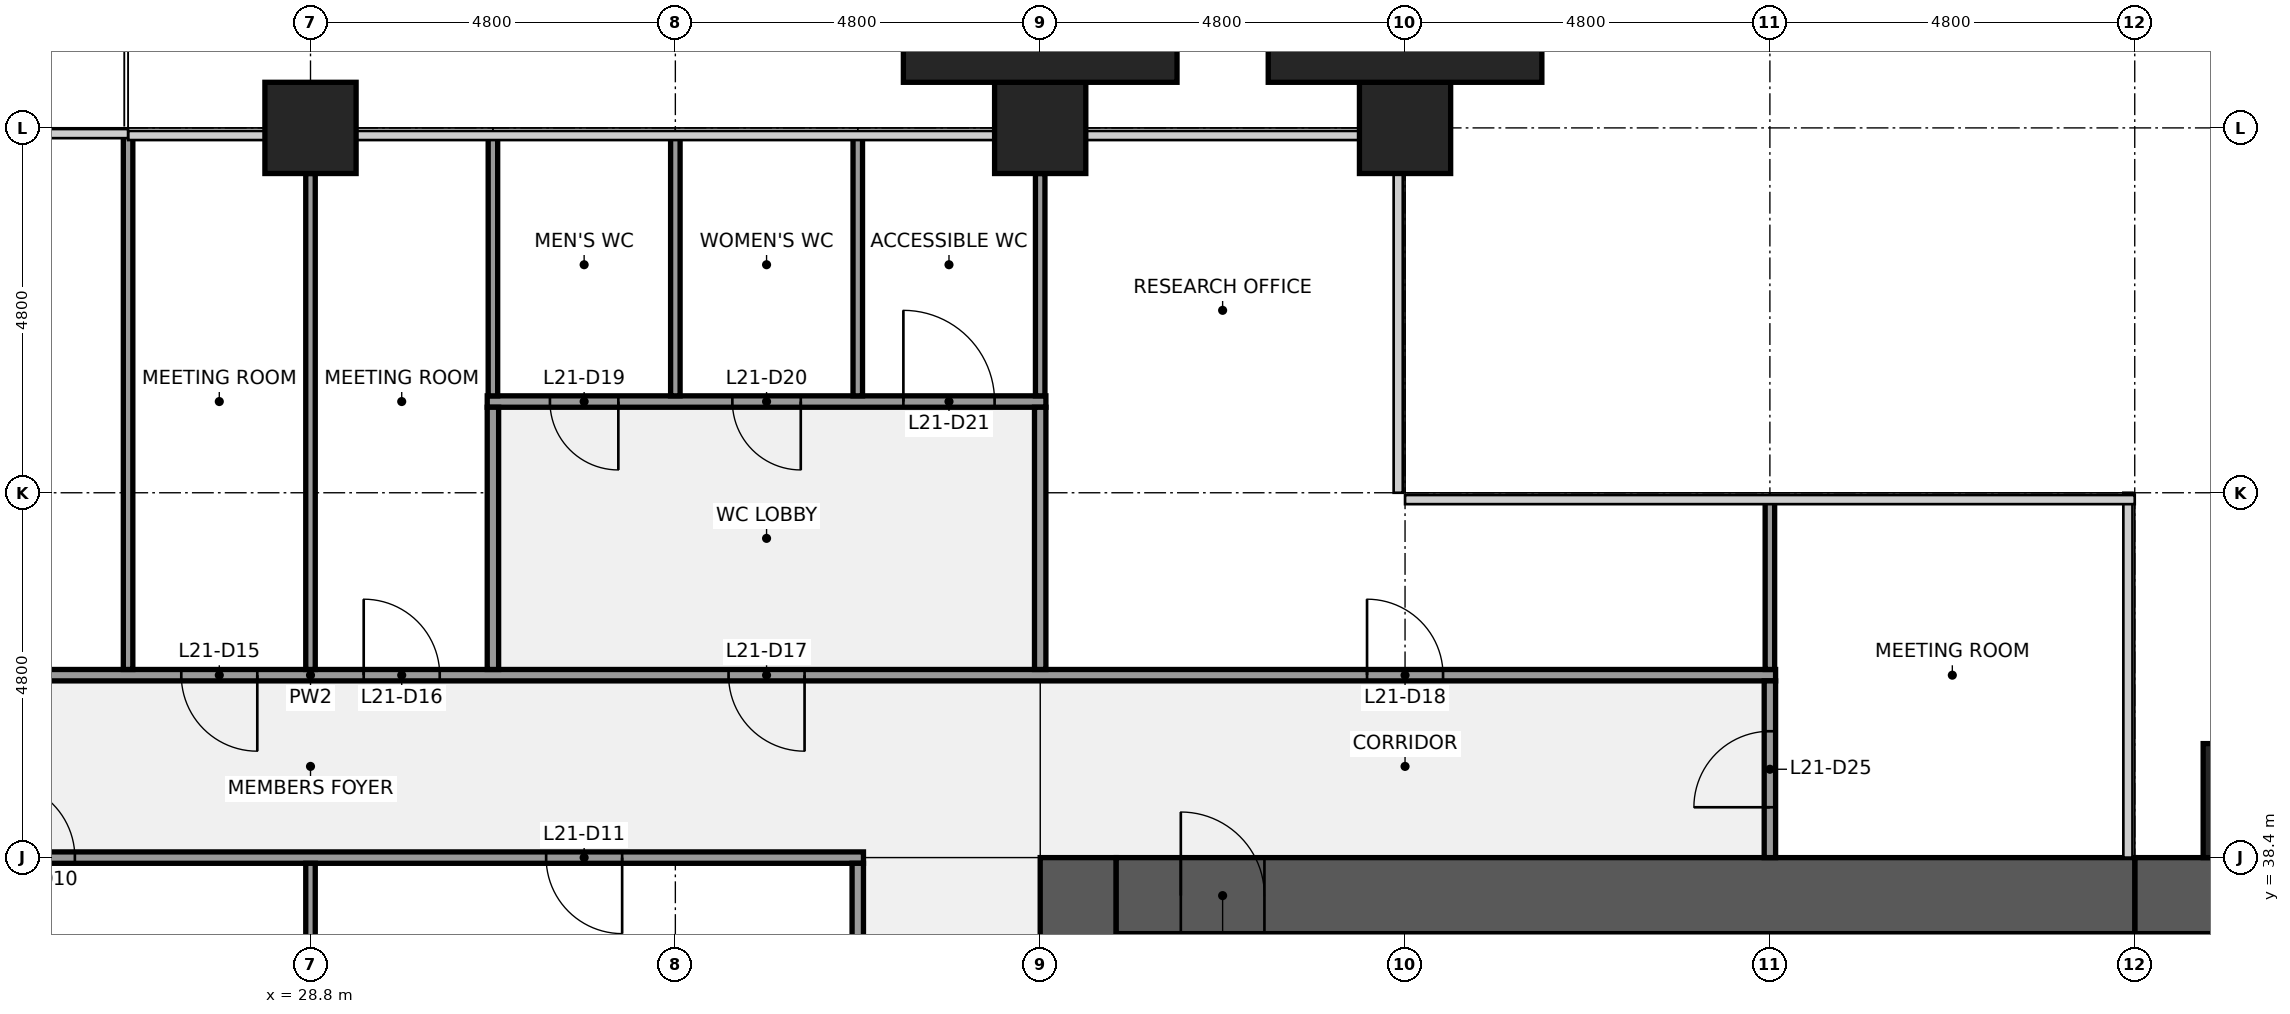
"""IFC4 building model, lengths in metres.
Left out: names, types, materials, properties, quantities, classifications, styles, units other than length and angle.
Written with IfcOpenShell. Run it as: python <this file> out.ifc"""

import sys

from ifc_helpers import new_model, si_unit, direction, frame, frame_2d, origin, origin_2d, place, context, subcontext, project, spatial, rectangle, extrude, element, fill, save


model = new_model("IFC4")
c1 = context("Model", 3, precision=1e-05, world=origin(), true_north=direction((0.0, 1.0)))
c2 = subcontext(c1, "Body", "Model", "MODEL_VIEW")
j1 = project(units=[si_unit("LENGTHUNIT", "METRE"), si_unit("PLANEANGLEUNIT", "RADIAN")], contexts=[c1])
p1 = place(None, origin())
s1 = spatial("IfcSite", under=j1, at=p1, CompositionType="ELEMENT")
p2 = place(p1, origin())
s2 = spatial("IfcBuilding", under=s1, at=p2, CompositionType="ELEMENT")
p3 = place(p2, frame((0.0, 0.0, 104.1)))
s3 = spatial("IfcBuildingStorey", under=s2, at=p3, CompositionType="ELEMENT", Elevation=104.1)
for number, where, z_axis, x_axis in (
    (1, (28.8, 48.0, 0.0), (0.0, 0.0, 1.0), (1.0, 0.0, 0.0)),
    (2, (38.4, 48.0, 0.0), (0.0, 0.0, 1.0), (1.0, 0.0, 0.0)),
    (3, (43.2, 48.0, 0.0), (0.0, 0.0, 1.0), (1.0, 0.0, 0.0)),
):
    element("IfcColumn", number, at=place(p3, frame(where, z_axis=z_axis, x_axis=x_axis)), inside=s3, PredefinedType="COLUMN", context=c2, shape_type="SweptSolid", body=[
        extrude(rectangle(XDim=1.2, YDim=1.2, at=origin_2d()), origin(), (0.0, 0.0, 1.0), 4.0),
    ])
p4 = place(p3, frame((38.9, 9.6, 0.0), z_axis=(0.0, 0.0, 1.0), x_axis=(0.0, 1.0, 0.0)))
e4 = element("IfcWall", 4, at=p4, inside=s3, PredefinedType="SHEAR", context=c2, shape_type="SweptSolid", body=[
    extrude(rectangle(XDim=28.8, YDim=1.0, at=frame_2d((14.4, 0.0))), origin(), (0.0, 0.0, 1.0), 3.84),
])
p5 = place(p4, frame((8.7, 0.0, 0.0)))
e5 = element("IfcOpeningElement", 5, at=p5, cuts=e4, PredefinedType="OPENING", context=c2, shape_type="SweptSolid", body=[
    extrude(rectangle(XDim=1.8, YDim=2.1, at=frame_2d((0.9, 1.05))), frame((0.0, 0.51, 0.0), z_axis=(0.0, -1.0, 0.0), x_axis=(1.0, 0.0, 0.0)), (0.0, 0.0, 1.0), 1.02),
])
p6 = place(p4, frame((18.3, 0.0, 0.0)))
e6 = element("IfcOpeningElement", 6, at=p6, cuts=e4, PredefinedType="OPENING", context=c2, shape_type="SweptSolid", body=[
    extrude(rectangle(XDim=1.8, YDim=2.1, at=frame_2d((0.9, 1.05))), frame((0.0, 0.51, 0.0), z_axis=(0.0, -1.0, 0.0), x_axis=(1.0, 0.0, 0.0)), (0.0, 0.0, 1.0), 1.02),
])
p7 = place(p3, frame((43.85, 37.3, 0.0), z_axis=(0.0, 0.0, 1.0), x_axis=(1.0, 0.0, 0.0)))
e7 = element("IfcWall", 7, at=p7, inside=s3, PredefinedType="SHEAR", context=c2, shape_type="SweptSolid", body=[
    extrude(rectangle(XDim=7.5, YDim=0.2, at=frame_2d((3.75, 0.0))), origin(), (0.0, 0.0, 1.0), 3.84),
])
p8 = place(p3, frame((52.8, 37.9, 0.0), z_axis=(0.0, 0.0, 1.0), x_axis=(1.0, 0.0, 0.0)))
e8 = element("IfcWall", 8, at=p8, inside=s3, PredefinedType="SHEAR", context=c2, shape_type="SweptSolid", body=[
    extrude(rectangle(XDim=3.8, YDim=1.0, at=frame_2d((1.9, 0.0))), origin(), (0.0, 0.0, 1.0), 3.84),
])
p9 = place(p3, frame((39.4, 37.9, 0.0), z_axis=(0.0, 0.0, 1.0), x_axis=(1.0, 0.0, 0.0)))
e9 = element("IfcWall", 9, at=p9, inside=s3, PredefinedType="SHEAR", context=c2, shape_type="SweptSolid", body=[
    extrude(rectangle(XDim=13.4, YDim=1.0, at=frame_2d((6.7, 0.0))), origin(), (0.0, 0.0, 1.0), 3.84),
])
p10 = place(p9, frame((0.85, 0.0, 0.0)))
e10 = element("IfcOpeningElement", 10, at=p10, cuts=e9, PredefinedType="OPENING", context=c2, shape_type="SweptSolid", body=[
    extrude(rectangle(XDim=1.1, YDim=2.1, at=frame_2d((0.55, 1.05))), frame((0.0, 0.51, 0.0), z_axis=(0.0, -1.0, 0.0), x_axis=(1.0, 0.0, 0.0)), (0.0, 0.0, 1.0), 1.02),
])
p11 = place(p3, frame((21.525, 38.4, 0.0), z_axis=(0.0, 0.0, 1.0), x_axis=(1.0, 0.0, 0.0)))
e11 = element("IfcWall", 11, at=p11, inside=s3, PredefinedType="PARTITIONING", context=c2, shape_type="SweptSolid", body=[
    extrude(rectangle(XDim=14.55, YDim=0.15, at=frame_2d((7.275, 0.0))), origin(), (0.0, 0.0, 1.0), 2.936),
])
p12 = place(p11, frame((3.175, 0.0, 0.0)))
e12 = element("IfcOpeningElement", 12, at=p12, cuts=e11, PredefinedType="OPENING", context=c2, shape_type="SweptSolid", body=[
    extrude(rectangle(XDim=1.0, YDim=2.1, at=frame_2d((0.5, 1.05))), frame((0.0, 0.085, 0.0), z_axis=(0.0, -1.0, 0.0), x_axis=(1.0, 0.0, 0.0)), (0.0, 0.0, 1.0), 0.17),
])
p13 = place(p11, frame((10.375, 0.0, 0.0)))
e13 = element("IfcOpeningElement", 13, at=p13, cuts=e11, PredefinedType="OPENING", context=c2, shape_type="SweptSolid", body=[
    extrude(rectangle(XDim=1.0, YDim=2.1, at=frame_2d((0.5, 1.05))), frame((0.0, 0.085, 0.0), z_axis=(0.0, -1.0, 0.0), x_axis=(1.0, 0.0, 0.0)), (0.0, 0.0, 1.0), 0.17),
])
p14 = place(p3, frame((9.525, 40.8, 0.0), z_axis=(0.0, 0.0, 1.0), x_axis=(1.0, 0.0, 0.0)))
e14 = element("IfcWall", 14, at=p14, inside=s3, PredefinedType="PARTITIONING", context=c2, shape_type="SweptSolid", body=[
    extrude(rectangle(XDim=38.55, YDim=0.15, at=frame_2d((19.275, 0.0))), origin(), (0.0, 0.0, 1.0), 2.936),
])
p15 = place(p14, frame((4.375, 0.0, 0.0)))
e15 = element("IfcOpeningElement", 15, at=p15, cuts=e14, PredefinedType="OPENING", context=c2, shape_type="SweptSolid", body=[
    extrude(rectangle(XDim=1.0, YDim=2.1, at=frame_2d((0.5, 1.05))), frame((0.0, 0.085, 0.0), z_axis=(0.0, -1.0, 0.0), x_axis=(1.0, 0.0, 0.0)), (0.0, 0.0, 1.0), 0.17),
])
p16 = place(p14, frame((10.375, 0.0, 0.0)))
e16 = element("IfcOpeningElement", 16, at=p16, cuts=e14, PredefinedType="OPENING", context=c2, shape_type="SweptSolid", body=[
    extrude(rectangle(XDim=1.0, YDim=2.1, at=frame_2d((0.5, 1.05))), frame((0.0, 0.085, 0.0), z_axis=(0.0, -1.0, 0.0), x_axis=(1.0, 0.0, 0.0)), (0.0, 0.0, 1.0), 0.17),
])
p17 = place(p14, frame((13.975, 0.0, 0.0)))
e17 = element("IfcOpeningElement", 17, at=p17, cuts=e14, PredefinedType="OPENING", context=c2, shape_type="SweptSolid", body=[
    extrude(rectangle(XDim=1.0, YDim=2.1, at=frame_2d((0.5, 1.05))), frame((0.0, 0.085, 0.0), z_axis=(0.0, -1.0, 0.0), x_axis=(1.0, 0.0, 0.0)), (0.0, 0.0, 1.0), 0.17),
])
p18 = place(p14, frame((17.575, 0.0, 0.0)))
e18 = element("IfcOpeningElement", 18, at=p18, cuts=e14, PredefinedType="OPENING", context=c2, shape_type="SweptSolid", body=[
    extrude(rectangle(XDim=1.0, YDim=2.1, at=frame_2d((0.5, 1.05))), frame((0.0, 0.085, 0.0), z_axis=(0.0, -1.0, 0.0), x_axis=(1.0, 0.0, 0.0)), (0.0, 0.0, 1.0), 0.17),
])
p19 = place(p14, frame((19.975, 0.0, 0.0)))
e19 = element("IfcOpeningElement", 19, at=p19, cuts=e14, PredefinedType="OPENING", context=c2, shape_type="SweptSolid", body=[
    extrude(rectangle(XDim=1.0, YDim=2.1, at=frame_2d((0.5, 1.05))), frame((0.0, 0.085, 0.0), z_axis=(0.0, -1.0, 0.0), x_axis=(1.0, 0.0, 0.0)), (0.0, 0.0, 1.0), 0.17),
])
p20 = place(p14, frame((24.775, 0.0, 0.0)))
e20 = element("IfcOpeningElement", 20, at=p20, cuts=e14, PredefinedType="OPENING", context=c2, shape_type="SweptSolid", body=[
    extrude(rectangle(XDim=1.0, YDim=2.1, at=frame_2d((0.5, 1.05))), frame((0.0, 0.085, 0.0), z_axis=(0.0, -1.0, 0.0), x_axis=(1.0, 0.0, 0.0)), (0.0, 0.0, 1.0), 0.17),
])
p21 = place(p14, frame((33.175, 0.0, 0.0)))
e21 = element("IfcOpeningElement", 21, at=p21, cuts=e14, PredefinedType="OPENING", context=c2, shape_type="SweptSolid", body=[
    extrude(rectangle(XDim=1.0, YDim=2.1, at=frame_2d((0.5, 1.05))), frame((0.0, 0.085, 0.0), z_axis=(0.0, -1.0, 0.0), x_axis=(1.0, 0.0, 0.0)), (0.0, 0.0, 1.0), 0.17),
])
p22 = place(p3, frame((31.125, 44.4, 0.0), z_axis=(0.0, 0.0, 1.0), x_axis=(1.0, 0.0, 0.0)))
e22 = element("IfcWall", 22, at=p22, inside=s3, PredefinedType="PARTITIONING", context=c2, shape_type="SweptSolid", body=[
    extrude(rectangle(XDim=7.35, YDim=0.15, at=frame_2d((3.675, 0.0))), origin(), (0.0, 0.0, 1.0), 2.936),
])
p23 = place(p22, frame((0.825, 0.0, 0.0)))
e23 = element("IfcOpeningElement", 23, at=p23, cuts=e22, PredefinedType="OPENING", context=c2, shape_type="SweptSolid", body=[
    extrude(rectangle(XDim=0.9, YDim=2.1, at=frame_2d((0.45, 1.05))), frame((0.0, 0.085, 0.0), z_axis=(0.0, -1.0, 0.0), x_axis=(1.0, 0.0, 0.0)), (0.0, 0.0, 1.0), 0.17),
])
p24 = place(p22, frame((3.225, 0.0, 0.0)))
e24 = element("IfcOpeningElement", 24, at=p24, cuts=e22, PredefinedType="OPENING", context=c2, shape_type="SweptSolid", body=[
    extrude(rectangle(XDim=0.9, YDim=2.1, at=frame_2d((0.45, 1.05))), frame((0.0, 0.085, 0.0), z_axis=(0.0, -1.0, 0.0), x_axis=(1.0, 0.0, 0.0)), (0.0, 0.0, 1.0), 0.17),
])
p25 = place(p22, frame((5.475, 0.0, 0.0)))
e25 = element("IfcOpeningElement", 25, at=p25, cuts=e22, PredefinedType="OPENING", context=c2, shape_type="SweptSolid", body=[
    extrude(rectangle(XDim=1.2, YDim=2.1, at=frame_2d((0.6, 1.05))), frame((0.0, 0.085, 0.0), z_axis=(0.0, -1.0, 0.0), x_axis=(1.0, 0.0, 0.0)), (0.0, 0.0, 1.0), 0.17),
])
p26 = place(p3, frame((26.4, 40.875, 0.0), z_axis=(0.0, 0.0, 1.0), x_axis=(0.0, 1.0, 0.0)))
e26 = element("IfcWall", 26, at=p26, inside=s3, PredefinedType="PARTITIONING", context=c2, shape_type="SweptSolid", body=[
    extrude(rectangle(XDim=7.025, YDim=0.125, at=frame_2d((3.512, 0.0))), origin(), (0.0, 0.0, 1.0), 2.936),
])
p27 = place(p3, frame((28.8, 33.663, 0.0), z_axis=(0.0, 0.0, 1.0), x_axis=(0.0, 1.0, 0.0)))
e27 = element("IfcWall", 27, at=p27, inside=s3, PredefinedType="PARTITIONING", context=c2, shape_type="SweptSolid", body=[
    extrude(rectangle(XDim=4.662, YDim=0.125, at=frame_2d((2.331, 0.0))), origin(), (0.0, 0.0, 1.0), 2.936),
])
p28 = place(p3, frame((28.8, 40.875, 0.0), z_axis=(0.0, 0.0, 1.0), x_axis=(0.0, 1.0, 0.0)))
e28 = element("IfcWall", 28, at=p28, inside=s3, PredefinedType="PARTITIONING", context=c2, shape_type="SweptSolid", body=[
    extrude(rectangle(XDim=6.525, YDim=0.125, at=frame_2d((3.262, 0.0))), origin(), (0.0, 0.0, 1.0), 2.936),
])
p29 = place(p3, frame((31.2, 44.475, 0.0), z_axis=(0.0, 0.0, 1.0), x_axis=(0.0, 1.0, 0.0)))
e29 = element("IfcWall", 29, at=p29, inside=s3, PredefinedType="PARTITIONING", context=c2, shape_type="SweptSolid", body=[
    extrude(rectangle(XDim=3.425, YDim=0.125, at=frame_2d((1.712, 0.0))), origin(), (0.0, 0.0, 1.0), 2.936),
])
p30 = place(p3, frame((31.2, 40.875, 0.0), z_axis=(0.0, 0.0, 1.0), x_axis=(0.0, 1.0, 0.0)))
e30 = element("IfcWall", 30, at=p30, inside=s3, PredefinedType="PARTITIONING", context=c2, shape_type="SweptSolid", body=[
    extrude(rectangle(XDim=3.45, YDim=0.15, at=frame_2d((1.725, 0.0))), origin(), (0.0, 0.0, 1.0), 2.936),
])
for number, where, z_axis, x_axis in (
    (31, (33.6, 44.475, 0.0), (0.0, 0.0, 1.0), (0.0, 1.0, 0.0)),
    (32, (36.0, 44.475, 0.0), (0.0, 0.0, 1.0), (0.0, 1.0, 0.0)),
):
    element("IfcWall", number, at=place(p3, frame(where, z_axis=z_axis, x_axis=x_axis)), inside=s3, PredefinedType="PARTITIONING", context=c2, shape_type="SweptSolid", body=[
        extrude(rectangle(XDim=3.425, YDim=0.125, at=frame_2d((1.712, 0.0))), origin(), (0.0, 0.0, 1.0), 2.936),
    ])
p31 = place(p3, frame((36.0, 33.675, 0.0), z_axis=(0.0, 0.0, 1.0), x_axis=(0.0, 1.0, 0.0)))
e33 = element("IfcWall", 33, at=p31, inside=s3, PredefinedType="PARTITIONING", context=c2, shape_type="SweptSolid", body=[
    extrude(rectangle(XDim=4.65, YDim=0.15, at=frame_2d((2.325, 0.0))), origin(), (0.0, 0.0, 1.0), 2.936),
])
p32 = place(p3, frame((38.4, 44.475, 0.0), z_axis=(0.0, 0.0, 1.0), x_axis=(0.0, 1.0, 0.0)))
e34 = element("IfcWall", 34, at=p32, inside=s3, PredefinedType="PARTITIONING", context=c2, shape_type="SweptSolid", body=[
    extrude(rectangle(XDim=2.925, YDim=0.125, at=frame_2d((1.462, 0.0))), origin(), (0.0, 0.0, 1.0), 2.936),
])
p33 = place(p3, frame((38.4, 40.875, 0.0), z_axis=(0.0, 0.0, 1.0), x_axis=(0.0, 1.0, 0.0)))
e35 = element("IfcWall", 35, at=p33, inside=s3, PredefinedType="PARTITIONING", context=c2, shape_type="SweptSolid", body=[
    extrude(rectangle(XDim=3.45, YDim=0.15, at=frame_2d((1.725, 0.0))), origin(), (0.0, 0.0, 1.0), 2.936),
])
p34 = place(p3, frame((48.0, 40.875, 0.0), z_axis=(0.0, 0.0, 1.0), x_axis=(0.0, 1.0, 0.0)))
e36 = element("IfcWall", 36, at=p34, inside=s3, PredefinedType="PARTITIONING", context=c2, shape_type="SweptSolid", body=[
    extrude(rectangle(XDim=2.225, YDim=0.125, at=frame_2d((1.113, 0.0))), origin(), (0.0, 0.0, 1.0), 2.936),
])
p35 = place(p3, frame((48.0, 38.4, 0.0), z_axis=(0.0, 0.0, 1.0), x_axis=(0.0, 1.0, 0.0)))
e37 = element("IfcWall", 37, at=p35, inside=s3, PredefinedType="PARTITIONING", context=c2, shape_type="SweptSolid", body=[
    extrude(rectangle(XDim=2.325, YDim=0.15, at=frame_2d((1.163, 0.0))), origin(), (0.0, 0.0, 1.0), 2.936),
])
p36 = place(p35, frame((0.663, 0.0, 0.0)))
e38 = element("IfcOpeningElement", 38, at=p36, cuts=e37, PredefinedType="OPENING", context=c2, shape_type="SweptSolid", body=[
    extrude(rectangle(XDim=1.0, YDim=2.1, at=frame_2d((0.5, 1.05))), frame((0.0, 0.085, 0.0), z_axis=(0.0, -1.0, 0.0), x_axis=(1.0, 0.0, 0.0)), (0.0, 0.0, 1.0), 0.17),
])
p37 = place(p3, frame((55.2, 39.15, 0.0), z_axis=(0.0, 0.0, 1.0), x_axis=(1.0, 0.0, 0.0)))
e39 = element("IfcColumn", 39, at=p37, inside=s3, PredefinedType="PILASTER", context=c2, shape_type="SweptSolid", body=[
    extrude(rectangle(XDim=3.0, YDim=1.5, at=origin_2d()), origin(), (0.0, 0.0, 1.0), 4.0),
])
for number, where, z_axis, x_axis in (
    (40, (38.4, 49.05, 0.0), (0.0, 0.0, 1.0), (1.0, 0.0, 0.0)),
    (41, (43.2, 49.05, 0.0), (0.0, 0.0, 1.0), (1.0, 0.0, 0.0)),
):
    element("IfcColumn", number, at=place(p3, frame(where, z_axis=z_axis, x_axis=x_axis)), inside=s3, PredefinedType="PILASTER", context=c2, shape_type="SweptSolid", body=[
        extrude(rectangle(XDim=3.6, YDim=0.9, at=origin_2d()), origin(), (0.0, 0.0, 1.0), 4.0),
    ])
p38 = place(p10, origin())
e42 = element("IfcDoor", 42, at=p38, inside=s3, OperationType="SINGLE_SWING_LEFT", PredefinedType="DOOR", context=c2, shape_type="SweptSolid", body=[
    extrude(rectangle(XDim=1.1, YDim=2.1, at=frame_2d((0.55, 1.05))), frame((0.0, 0.025, 0.0), z_axis=(0.0, -1.0, 0.0), x_axis=(1.0, 0.0, 0.0)), (0.0, 0.0, 1.0), 0.05),
])
fill(e10, e42)
p39 = place(p12, origin())
e43 = element("IfcDoor", 43, at=p39, inside=s3, OperationType="SINGLE_SWING_LEFT", PredefinedType="DOOR", context=c2, shape_type="SweptSolid", body=[
    extrude(rectangle(XDim=1.0, YDim=2.1, at=frame_2d((0.5, 1.05))), frame((0.0, 0.025, 0.0), z_axis=(0.0, -1.0, 0.0), x_axis=(1.0, 0.0, 0.0)), (0.0, 0.0, 1.0), 0.05),
])
fill(e12, e43)
p40 = place(p13, origin())
e44 = element("IfcDoor", 44, at=p40, inside=s3, OperationType="SINGLE_SWING_RIGHT", PredefinedType="DOOR", context=c2, shape_type="SweptSolid", body=[
    extrude(rectangle(XDim=1.0, YDim=2.1, at=frame_2d((0.5, 1.05))), frame((0.0, 0.025, 0.0), z_axis=(0.0, -1.0, 0.0), x_axis=(1.0, 0.0, 0.0)), (0.0, 0.0, 1.0), 0.05),
])
fill(e13, e44)
p41 = place(p18, origin())
e45 = element("IfcDoor", 45, at=p41, inside=s3, OperationType="SINGLE_SWING_RIGHT", PredefinedType="DOOR", context=c2, shape_type="SweptSolid", body=[
    extrude(rectangle(XDim=1.0, YDim=2.1, at=frame_2d((0.5, 1.05))), frame((0.0, 0.025, 0.0), z_axis=(0.0, -1.0, 0.0), x_axis=(1.0, 0.0, 0.0)), (0.0, 0.0, 1.0), 0.05),
])
fill(e18, e45)
p42 = place(p19, origin())
e46 = element("IfcDoor", 46, at=p42, inside=s3, OperationType="SINGLE_SWING_LEFT", PredefinedType="DOOR", context=c2, shape_type="SweptSolid", body=[
    extrude(rectangle(XDim=1.0, YDim=2.1, at=frame_2d((0.5, 1.05))), frame((0.0, 0.025, 0.0), z_axis=(0.0, -1.0, 0.0), x_axis=(1.0, 0.0, 0.0)), (0.0, 0.0, 1.0), 0.05),
])
fill(e19, e46)
p43 = place(p20, origin())
e47 = element("IfcDoor", 47, at=p43, inside=s3, OperationType="SINGLE_SWING_RIGHT", PredefinedType="DOOR", context=c2, shape_type="SweptSolid", body=[
    extrude(rectangle(XDim=1.0, YDim=2.1, at=frame_2d((0.5, 1.05))), frame((0.0, 0.025, 0.0), z_axis=(0.0, -1.0, 0.0), x_axis=(1.0, 0.0, 0.0)), (0.0, 0.0, 1.0), 0.05),
])
fill(e20, e47)
p44 = place(p21, origin())
e48 = element("IfcDoor", 48, at=p44, inside=s3, OperationType="SINGLE_SWING_LEFT", PredefinedType="DOOR", context=c2, shape_type="SweptSolid", body=[
    extrude(rectangle(XDim=1.0, YDim=2.1, at=frame_2d((0.5, 1.05))), frame((0.0, 0.025, 0.0), z_axis=(0.0, -1.0, 0.0), x_axis=(1.0, 0.0, 0.0)), (0.0, 0.0, 1.0), 0.05),
])
fill(e21, e48)
p45 = place(p23, origin())
e49 = element("IfcDoor", 49, at=p45, inside=s3, OperationType="SINGLE_SWING_RIGHT", PredefinedType="DOOR", context=c2, shape_type="SweptSolid", body=[
    extrude(rectangle(XDim=0.9, YDim=2.1, at=frame_2d((0.45, 1.05))), frame((0.0, 0.025, 0.0), z_axis=(0.0, -1.0, 0.0), x_axis=(1.0, 0.0, 0.0)), (0.0, 0.0, 1.0), 0.05),
])
fill(e23, e49)
p46 = place(p24, origin())
e50 = element("IfcDoor", 50, at=p46, inside=s3, OperationType="SINGLE_SWING_RIGHT", PredefinedType="DOOR", context=c2, shape_type="SweptSolid", body=[
    extrude(rectangle(XDim=0.9, YDim=2.1, at=frame_2d((0.45, 1.05))), frame((0.0, 0.025, 0.0), z_axis=(0.0, -1.0, 0.0), x_axis=(1.0, 0.0, 0.0)), (0.0, 0.0, 1.0), 0.05),
])
fill(e24, e50)
p47 = place(p25, origin())
e51 = element("IfcDoor", 51, at=p47, inside=s3, OperationType="SINGLE_SWING_LEFT", PredefinedType="DOOR", context=c2, shape_type="SweptSolid", body=[
    extrude(rectangle(XDim=1.2, YDim=2.1, at=frame_2d((0.6, 1.05))), frame((0.0, 0.025, 0.0), z_axis=(0.0, -1.0, 0.0), x_axis=(1.0, 0.0, 0.0)), (0.0, 0.0, 1.0), 0.05),
])
fill(e25, e51)
p48 = place(p36, origin())
e52 = element("IfcDoor", 52, at=p48, inside=s3, OperationType="SINGLE_SWING_LEFT", PredefinedType="DOOR", context=c2, shape_type="SweptSolid", body=[
    extrude(rectangle(XDim=1.0, YDim=2.1, at=frame_2d((0.5, 1.05))), frame((0.0, 0.025, 0.0), z_axis=(0.0, -1.0, 0.0), x_axis=(1.0, 0.0, 0.0)), (0.0, 0.0, 1.0), 0.05),
])
fill(e38, e52)
save(model, sys.argv[1])
